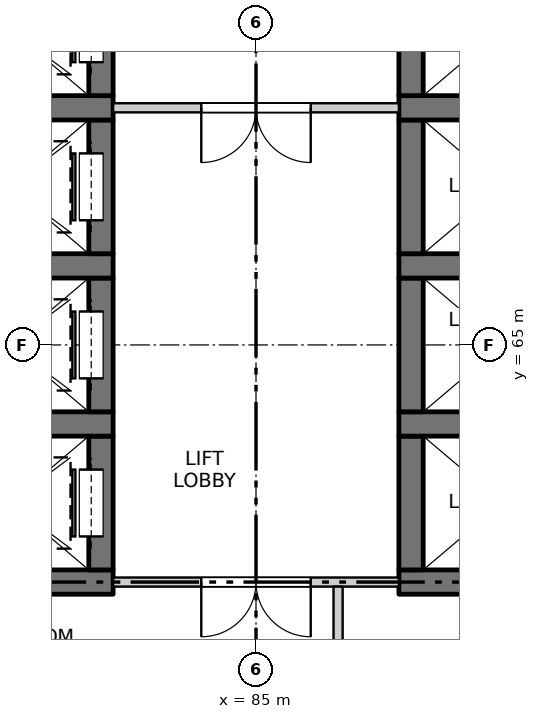
"""IFC4 building model, lengths in metres.
Left out: names, types, materials, properties, quantities, classifications, styles, units other than length and angle.
Written with IfcOpenShell. Run it as: python <this file> out.ifc"""

import sys

from ifc_helpers import new_model, si_unit, direction, frame, frame_2d, origin, place, context, subcontext, project, spatial, rectangle, extrude, element, fill, save


model = new_model("IFC4")
c1 = context("Model", 3, precision=1e-05, world=origin(), true_north=direction((0.0, 1.0)))
c2 = subcontext(c1, "Body", "Model", "MODEL_VIEW")
j1 = project(units=[si_unit("LENGTHUNIT", "METRE"), si_unit("PLANEANGLEUNIT", "RADIAN")], contexts=[c1])
p1 = place(None, origin())
s1 = spatial("IfcSite", under=j1, at=p1, CompositionType="ELEMENT")
p2 = place(p1, origin())
s2 = spatial("IfcBuilding", under=s1, at=p2, CompositionType="ELEMENT")
p3 = place(p2, frame((0.0, 0.0, 36.5)))
s3 = spatial("IfcBuildingStorey", under=s2, at=p3, CompositionType="ELEMENT", Elevation=36.5)
p4 = place(p3, frame((79.65, 61.1, -0.25), z_axis=(0.0, 0.0, 1.0), x_axis=(1.0, 0.0, 0.0)))
e1 = element("IfcWall", 1, at=p4, inside=s3, PredefinedType="SOLIDWALL", context=c2, shape_type="SweptSolid", body=[
    extrude(rectangle(XDim=3.0, YDim=0.4, at=frame_2d((1.5, 0.0))), origin(), (0.0, 0.0, 1.0), 3.4),
])
p5 = place(p3, frame((82.45, 61.3, -0.25), z_axis=(0.0, 0.0, 1.0), x_axis=(0.0, 1.0, 0.0)))
e2 = element("IfcWall", 2, at=p5, inside=s3, PredefinedType="SOLIDWALL", context=c2, shape_type="SweptSolid", body=[
    extrude(rectangle(XDim=2.2, YDim=0.4, at=frame_2d((1.1, 0.0))), origin(), (0.0, 0.0, 1.0), 3.4),
])
p6 = place(p5, frame((0.55, 0.0, 0.25)))
e3 = element("IfcOpeningElement", 3, at=p6, cuts=e2, PredefinedType="OPENING", context=c2, shape_type="SweptSolid", body=[
    extrude(rectangle(XDim=1.1, YDim=2.1, at=frame_2d((0.55, 1.05))), frame((0.0, 0.21, 0.0), z_axis=(0.0, -1.0, 0.0), x_axis=(1.0, 0.0, 0.0)), (0.0, 0.0, 1.0), 0.42),
])
p7 = place(p3, frame((79.65, 63.7, -0.25), z_axis=(0.0, 0.0, 1.0), x_axis=(1.0, 0.0, 0.0)))
e4 = element("IfcWall", 4, at=p7, inside=s3, PredefinedType="SOLIDWALL", context=c2, shape_type="SweptSolid", body=[
    extrude(rectangle(XDim=3.0, YDim=0.4, at=frame_2d((1.5, 0.0))), origin(), (0.0, 0.0, 1.0), 3.4),
])
p8 = place(p3, frame((82.45, 63.9, -0.25), z_axis=(0.0, 0.0, 1.0), x_axis=(0.0, 1.0, 0.0)))
e5 = element("IfcWall", 5, at=p8, inside=s3, PredefinedType="SOLIDWALL", context=c2, shape_type="SweptSolid", body=[
    extrude(rectangle(XDim=2.2, YDim=0.4, at=frame_2d((1.1, 0.0))), origin(), (0.0, 0.0, 1.0), 3.4),
])
p9 = place(p8, frame((0.55, 0.0, 0.25)))
e6 = element("IfcOpeningElement", 6, at=p9, cuts=e5, PredefinedType="OPENING", context=c2, shape_type="SweptSolid", body=[
    extrude(rectangle(XDim=1.1, YDim=2.1, at=frame_2d((0.55, 1.05))), frame((0.0, 0.21, 0.0), z_axis=(0.0, -1.0, 0.0), x_axis=(1.0, 0.0, 0.0)), (0.0, 0.0, 1.0), 0.42),
])
p10 = place(p3, frame((79.65, 66.3, -0.25), z_axis=(0.0, 0.0, 1.0), x_axis=(1.0, 0.0, 0.0)))
e7 = element("IfcWall", 7, at=p10, inside=s3, PredefinedType="SOLIDWALL", context=c2, shape_type="SweptSolid", body=[
    extrude(rectangle(XDim=3.0, YDim=0.4, at=frame_2d((1.5, 0.0))), origin(), (0.0, 0.0, 1.0), 3.4),
])
p11 = place(p3, frame((82.45, 66.5, -0.25), z_axis=(0.0, 0.0, 1.0), x_axis=(0.0, 1.0, 0.0)))
e8 = element("IfcWall", 8, at=p11, inside=s3, PredefinedType="SOLIDWALL", context=c2, shape_type="SweptSolid", body=[
    extrude(rectangle(XDim=2.2, YDim=0.4, at=frame_2d((1.1, 0.0))), origin(), (0.0, 0.0, 1.0), 3.4),
])
p12 = place(p11, frame((0.55, 0.0, 0.25)))
e9 = element("IfcOpeningElement", 9, at=p12, cuts=e8, PredefinedType="OPENING", context=c2, shape_type="SweptSolid", body=[
    extrude(rectangle(XDim=1.1, YDim=2.1, at=frame_2d((0.55, 1.05))), frame((0.0, 0.21, 0.0), z_axis=(0.0, -1.0, 0.0), x_axis=(1.0, 0.0, 0.0)), (0.0, 0.0, 1.0), 0.42),
])
p13 = place(p3, frame((79.65, 68.9, -0.25), z_axis=(0.0, 0.0, 1.0), x_axis=(1.0, 0.0, 0.0)))
e10 = element("IfcWall", 10, at=p13, inside=s3, PredefinedType="SOLIDWALL", context=c2, shape_type="SweptSolid", body=[
    extrude(rectangle(XDim=3.0, YDim=0.4, at=frame_2d((1.5, 0.0))), origin(), (0.0, 0.0, 1.0), 3.4),
])
p14 = place(p3, frame((82.45, 69.1, -0.25), z_axis=(0.0, 0.0, 1.0), x_axis=(0.0, 1.0, 0.0)))
e11 = element("IfcWall", 11, at=p14, inside=s3, PredefinedType="SOLIDWALL", context=c2, shape_type="SweptSolid", body=[
    extrude(rectangle(XDim=2.2, YDim=0.4, at=frame_2d((1.1, 0.0))), origin(), (0.0, 0.0, 1.0), 3.4),
])
p15 = place(p14, frame((0.55, 0.0, 0.25)))
e12 = element("IfcOpeningElement", 12, at=p15, cuts=e11, PredefinedType="OPENING", context=c2, shape_type="SweptSolid", body=[
    extrude(rectangle(XDim=1.1, YDim=2.1, at=frame_2d((0.55, 1.05))), frame((0.0, 0.21, 0.0), z_axis=(0.0, -1.0, 0.0), x_axis=(1.0, 0.0, 0.0)), (0.0, 0.0, 1.0), 0.42),
])
p16 = place(p3, frame((87.35, 61.1, -0.25), z_axis=(0.0, 0.0, 1.0), x_axis=(1.0, 0.0, 0.0)))
e13 = element("IfcWall", 13, at=p16, inside=s3, PredefinedType="SOLIDWALL", context=c2, shape_type="SweptSolid", body=[
    extrude(rectangle(XDim=3.0, YDim=0.4, at=frame_2d((1.5, 0.0))), origin(), (0.0, 0.0, 1.0), 3.4),
])
p17 = place(p3, frame((87.55, 61.3, -0.25), z_axis=(0.0, 0.0, 1.0), x_axis=(0.0, 1.0, 0.0)))
e14 = element("IfcWall", 14, at=p17, inside=s3, PredefinedType="SOLIDWALL", context=c2, shape_type="SweptSolid", body=[
    extrude(rectangle(XDim=2.2, YDim=0.4, at=frame_2d((1.1, 0.0))), origin(), (0.0, 0.0, 1.0), 3.4),
])
p18 = place(p3, frame((87.35, 63.7, -0.25), z_axis=(0.0, 0.0, 1.0), x_axis=(1.0, 0.0, 0.0)))
e15 = element("IfcWall", 15, at=p18, inside=s3, PredefinedType="SOLIDWALL", context=c2, shape_type="SweptSolid", body=[
    extrude(rectangle(XDim=3.0, YDim=0.4, at=frame_2d((1.5, 0.0))), origin(), (0.0, 0.0, 1.0), 3.4),
])
p19 = place(p3, frame((87.55, 63.9, -0.25), z_axis=(0.0, 0.0, 1.0), x_axis=(0.0, 1.0, 0.0)))
e16 = element("IfcWall", 16, at=p19, inside=s3, PredefinedType="SOLIDWALL", context=c2, shape_type="SweptSolid", body=[
    extrude(rectangle(XDim=2.2, YDim=0.4, at=frame_2d((1.1, 0.0))), origin(), (0.0, 0.0, 1.0), 3.4),
])
p20 = place(p3, frame((87.35, 66.3, -0.25), z_axis=(0.0, 0.0, 1.0), x_axis=(1.0, 0.0, 0.0)))
e17 = element("IfcWall", 17, at=p20, inside=s3, PredefinedType="SOLIDWALL", context=c2, shape_type="SweptSolid", body=[
    extrude(rectangle(XDim=3.0, YDim=0.4, at=frame_2d((1.5, 0.0))), origin(), (0.0, 0.0, 1.0), 3.4),
])
p21 = place(p3, frame((87.55, 66.5, -0.25), z_axis=(0.0, 0.0, 1.0), x_axis=(0.0, 1.0, 0.0)))
e18 = element("IfcWall", 18, at=p21, inside=s3, PredefinedType="SOLIDWALL", context=c2, shape_type="SweptSolid", body=[
    extrude(rectangle(XDim=2.2, YDim=0.4, at=frame_2d((1.1, 0.0))), origin(), (0.0, 0.0, 1.0), 3.4),
])
p22 = place(p3, frame((87.35, 68.9, -0.25), z_axis=(0.0, 0.0, 1.0), x_axis=(1.0, 0.0, 0.0)))
e19 = element("IfcWall", 19, at=p22, inside=s3, PredefinedType="SOLIDWALL", context=c2, shape_type="SweptSolid", body=[
    extrude(rectangle(XDim=3.0, YDim=0.4, at=frame_2d((1.5, 0.0))), origin(), (0.0, 0.0, 1.0), 3.4),
])
p23 = place(p3, frame((87.55, 69.1, -0.25), z_axis=(0.0, 0.0, 1.0), x_axis=(0.0, 1.0, 0.0)))
e20 = element("IfcWall", 20, at=p23, inside=s3, PredefinedType="SOLIDWALL", context=c2, shape_type="SweptSolid", body=[
    extrude(rectangle(XDim=2.2, YDim=0.4, at=frame_2d((1.1, 0.0))), origin(), (0.0, 0.0, 1.0), 3.4),
])
p24 = place(p3, frame((82.65, 61.1, 0.0), z_axis=(0.0, 0.0, 1.0), x_axis=(1.0, 0.0, 0.0)))
e21 = element("IfcWall", 21, at=p24, inside=s3, PredefinedType="PARTITIONING", context=c2, shape_type="SweptSolid", body=[
    extrude(rectangle(XDim=4.7, YDim=0.15, at=frame_2d((2.35, 0.0))), origin(), (0.0, 0.0, 1.0), 3.15),
])
p25 = place(p24, frame((1.45, 0.0, 0.0)))
e22 = element("IfcOpeningElement", 22, at=p25, cuts=e21, PredefinedType="OPENING", context=c2, shape_type="SweptSolid", body=[
    extrude(rectangle(XDim=1.8, YDim=2.1, at=frame_2d((0.9, 1.05))), frame((0.0, 0.085, 0.0), z_axis=(0.0, -1.0, 0.0), x_axis=(1.0, 0.0, 0.0)), (0.0, 0.0, 1.0), 0.17),
])
p26 = place(p3, frame((82.65, 68.9, 0.0), z_axis=(0.0, 0.0, 1.0), x_axis=(1.0, 0.0, 0.0)))
e23 = element("IfcWall", 23, at=p26, inside=s3, PredefinedType="PARTITIONING", context=c2, shape_type="SweptSolid", body=[
    extrude(rectangle(XDim=4.7, YDim=0.15, at=frame_2d((2.35, 0.0))), origin(), (0.0, 0.0, 1.0), 3.15),
])
p27 = place(p26, frame((1.45, 0.0, 0.0)))
e24 = element("IfcOpeningElement", 24, at=p27, cuts=e23, PredefinedType="OPENING", context=c2, shape_type="SweptSolid", body=[
    extrude(rectangle(XDim=1.8, YDim=2.1, at=frame_2d((0.9, 1.05))), frame((0.0, 0.085, 0.0), z_axis=(0.0, -1.0, 0.0), x_axis=(1.0, 0.0, 0.0)), (0.0, 0.0, 1.0), 0.17),
])
p28 = place(p3, frame((86.35, 55.6, 0.0), z_axis=(0.0, 0.0, 1.0), x_axis=(0.0, 1.0, 0.0)))
e25 = element("IfcWall", 25, at=p28, inside=s3, PredefinedType="PARTITIONING", context=c2, shape_type="SweptSolid", body=[
    extrude(rectangle(XDim=5.425, YDim=0.15, at=frame_2d((2.712, 0.0))), origin(), (0.0, 0.0, 1.0), 3.15),
])
p29 = place(p28, frame((2.1, 0.0, 0.0)))
e26 = element("IfcOpeningElement", 26, at=p29, cuts=e25, PredefinedType="OPENING", context=c2, shape_type="SweptSolid", body=[
    extrude(rectangle(XDim=0.9, YDim=2.1, at=frame_2d((0.45, 1.05))), frame((0.0, 0.085, 0.0), z_axis=(0.0, -1.0, 0.0), x_axis=(1.0, 0.0, 0.0)), (0.0, 0.0, 1.0), 0.17),
])
p30 = place(p25, origin())
e27 = element("IfcDoor", 27, at=p30, inside=s3, OperationType="DOUBLE_DOOR_SINGLE_SWING", PredefinedType="DOOR", context=c2, shape_type="SweptSolid", body=[
    extrude(rectangle(XDim=1.8, YDim=2.1, at=frame_2d((0.9, 1.05))), frame((0.0, 0.025, 0.0), z_axis=(0.0, -1.0, 0.0), x_axis=(1.0, 0.0, 0.0)), (0.0, 0.0, 1.0), 0.05),
])
fill(e22, e27)
p31 = place(p6, origin())
e28 = element("IfcDoor", 28, at=p31, inside=s3, OperationType="SLIDING_TO_RIGHT", PredefinedType="DOOR", context=c2, shape_type="SweptSolid", body=[
    extrude(rectangle(XDim=1.1, YDim=2.1, at=frame_2d((0.55, 1.05))), frame((0.0, 0.185, 0.0), z_axis=(0.0, -1.0, 0.0), x_axis=(1.0, 0.0, 0.0)), (0.0, 0.0, 1.0), 0.05),
])
fill(e3, e28)
p32 = place(p9, origin())
e29 = element("IfcDoor", 29, at=p32, inside=s3, OperationType="SLIDING_TO_RIGHT", PredefinedType="DOOR", context=c2, shape_type="SweptSolid", body=[
    extrude(rectangle(XDim=1.1, YDim=2.1, at=frame_2d((0.55, 1.05))), frame((0.0, 0.185, 0.0), z_axis=(0.0, -1.0, 0.0), x_axis=(1.0, 0.0, 0.0)), (0.0, 0.0, 1.0), 0.05),
])
fill(e6, e29)
p33 = place(p12, origin())
e30 = element("IfcDoor", 30, at=p33, inside=s3, OperationType="SLIDING_TO_RIGHT", PredefinedType="DOOR", context=c2, shape_type="SweptSolid", body=[
    extrude(rectangle(XDim=1.1, YDim=2.1, at=frame_2d((0.55, 1.05))), frame((0.0, 0.185, 0.0), z_axis=(0.0, -1.0, 0.0), x_axis=(1.0, 0.0, 0.0)), (0.0, 0.0, 1.0), 0.05),
])
fill(e9, e30)
p34 = place(p27, origin())
e31 = element("IfcDoor", 31, at=p34, inside=s3, OperationType="DOUBLE_DOOR_SINGLE_SWING", PredefinedType="DOOR", context=c2, shape_type="SweptSolid", body=[
    extrude(rectangle(XDim=1.8, YDim=2.1, at=frame_2d((0.9, 1.05))), frame((0.0, 0.025, 0.0), z_axis=(0.0, -1.0, 0.0), x_axis=(1.0, 0.0, 0.0)), (0.0, 0.0, 1.0), 0.05),
])
fill(e24, e31)
p35 = place(p15, origin())
e32 = element("IfcDoor", 32, at=p35, inside=s3, OperationType="SLIDING_TO_LEFT", PredefinedType="DOOR", context=c2, shape_type="SweptSolid", body=[
    extrude(rectangle(XDim=1.1, YDim=2.1, at=frame_2d((0.55, 1.05))), frame((0.0, 0.185, 0.0), z_axis=(0.0, -1.0, 0.0), x_axis=(1.0, 0.0, 0.0)), (0.0, 0.0, 1.0), 0.05),
])
fill(e12, e32)
save(model, sys.argv[1])
